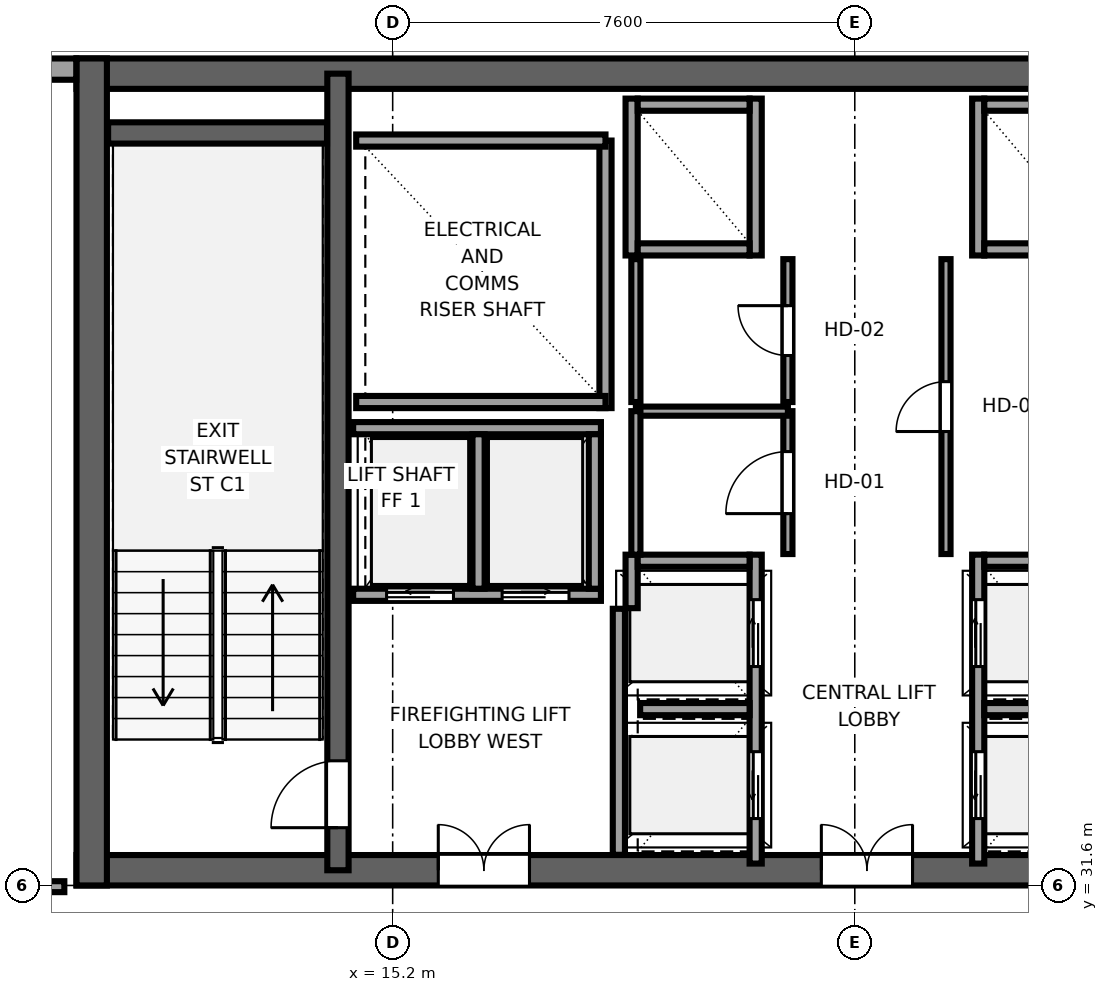
"""IFC4 building model, lengths in metres.
Left out: names, types, materials, properties, quantities, classifications, styles, units other than length and angle.
Written with IfcOpenShell. Run it as: python <this file> out.ifc"""

import sys

from ifc_helpers import new_model, si_unit, direction, frame, frame_2d, origin, place, context, subcontext, project, spatial, rectangle, extrude, source, transform, mapped, element, fill, save


model = new_model("IFC4")
c1 = context("Model", 3, precision=1e-05, world=origin(), true_north=direction((0.0, 1.0)))
c2 = subcontext(c1, "Body", "Model", "MODEL_VIEW")
j1 = project(units=[si_unit("LENGTHUNIT", "METRE"), si_unit("PLANEANGLEUNIT", "RADIAN")], contexts=[c1])
p1 = place(None, origin())
s1 = spatial("IfcSite", under=j1, at=p1, CompositionType="ELEMENT")
p2 = place(p1, origin())
s2 = spatial("IfcBuilding", under=s1, at=p2, CompositionType="ELEMENT")
p3 = place(p2, frame((0.0, 0.0, 245.2)))
s3 = spatial("IfcBuildingStorey", under=s2, at=p3, CompositionType="ELEMENT", Elevation=245.2)
p4 = place(p3, frame((10.0, 31.85, 0.0), z_axis=(0.0, 0.0, 1.0), x_axis=(1.0, 0.0, 0.0)))
e1 = element("IfcWall", 1, at=p4, inside=s3, PredefinedType="SHEAR", context=c2, shape_type="SweptSolid", body=[
    extrude(rectangle(XDim=26.0, YDim=0.5, at=frame_2d((13.0, 0.0))), origin(), (0.0, 0.0, 1.0), 3.55),
])
p5 = place(p4, frame((7.45, 0.0, 0.0), z_axis=(0.0, 0.0, 1.0), x_axis=(-1.0, 0.0, 0.0)))
e2 = element("IfcOpeningElement", 2, at=p5, cuts=e1, PredefinedType="OPENING", context=c2, shape_type="SweptSolid", body=[
    extrude(rectangle(XDim=1.5, YDim=2.04, at=frame_2d((0.75, 1.02))), frame((0.0, 0.26, 0.0), z_axis=(0.0, -1.0, 0.0), x_axis=(1.0, 0.0, 0.0)), (0.0, 0.0, 1.0), 0.52),
])
p6 = place(p4, frame((13.75, 0.0, 0.0), z_axis=(0.0, 0.0, 1.0), x_axis=(-1.0, 0.0, 0.0)))
e3 = element("IfcOpeningElement", 3, at=p6, cuts=e1, PredefinedType="OPENING", context=c2, shape_type="SweptSolid", body=[
    extrude(rectangle(XDim=1.5, YDim=2.04, at=frame_2d((0.75, 1.02))), frame((0.0, 0.26, 0.0), z_axis=(0.0, -1.0, 0.0), x_axis=(1.0, 0.0, 0.0)), (0.0, 0.0, 1.0), 0.52),
])
p7 = place(p4, frame((20.05, 0.0, 0.0), z_axis=(0.0, 0.0, 1.0), x_axis=(-1.0, 0.0, 0.0)))
e4 = element("IfcOpeningElement", 4, at=p7, cuts=e1, PredefinedType="OPENING", context=c2, shape_type="SweptSolid", body=[
    extrude(rectangle(XDim=1.5, YDim=2.04, at=frame_2d((0.75, 1.02))), frame((0.0, 0.26, 0.0), z_axis=(0.0, -1.0, 0.0), x_axis=(1.0, 0.0, 0.0)), (0.0, 0.0, 1.0), 0.52),
])
p8 = place(p3, frame((10.0, 44.95, 0.0), z_axis=(0.0, 0.0, 1.0), x_axis=(1.0, 0.0, 0.0)))
e5 = element("IfcWall", 5, at=p8, inside=s3, PredefinedType="SHEAR", context=c2, shape_type="SweptSolid", body=[
    extrude(rectangle(XDim=26.0, YDim=0.5, at=frame_2d((13.0, 0.0))), origin(), (0.0, 0.0, 1.0), 3.55),
])
p9 = place(p3, frame((10.25, 31.6, 0.0), z_axis=(0.0, 0.0, 1.0), x_axis=(0.0, 1.0, 0.0)))
e6 = element("IfcWall", 6, at=p9, inside=s3, PredefinedType="SHEAR", context=c2, shape_type="SweptSolid", body=[
    extrude(rectangle(XDim=13.6, YDim=0.5, at=frame_2d((6.8, 0.0))), origin(), (0.0, 0.0, 1.0), 3.55),
])
p10 = place(p3, frame((14.3, 31.85, 0.0), z_axis=(0.0, 0.0, 1.0), x_axis=(0.0, 1.0, 0.0)))
e7 = element("IfcWall", 7, at=p10, inside=s3, PredefinedType="SHEAR", context=c2, shape_type="SweptSolid", body=[
    extrude(rectangle(XDim=13.1, YDim=0.35, at=frame_2d((6.55, 0.0))), origin(), (0.0, 0.0, 1.0), 3.55),
])
p11 = place(p10, frame((0.7, 0.0, 0.0)))
e8 = element("IfcOpeningElement", 8, at=p11, cuts=e7, PredefinedType="OPENING", context=c2, shape_type="SweptSolid", body=[
    extrude(rectangle(XDim=1.1, YDim=2.12, at=frame_2d((0.55, 1.06))), frame((0.0, 0.185, 0.0), z_axis=(0.0, -1.0, 0.0), x_axis=(1.0, 0.0, 0.0)), (0.0, 0.0, 1.0), 0.37),
])
p12 = place(p3, frame((10.52, 43.975, 0.0), z_axis=(0.0, 0.0, 1.0), x_axis=(1.0, 0.0, 0.0)))
e9 = element("IfcWall", 9, at=p12, inside=s3, PredefinedType="SHEAR", context=c2, shape_type="SweptSolid", body=[
    extrude(rectangle(XDim=3.6, YDim=0.35, at=frame_2d((1.8, 0.0))), origin(), (0.0, 0.0, 1.0), 3.55),
])
p13 = place(p3, frame((9.996, 45.025, 0.0), z_axis=(0.0, 0.0, 1.0), x_axis=(-1.0, 0.0, 0.0)))
e10 = element("IfcWall", 10, at=p13, inside=s3, PredefinedType="SOLIDWALL", context=c2, shape_type="SweptSolid", body=[
    extrude(rectangle(XDim=2.979, YDim=0.35, at=frame_2d((1.49, 0.0))), origin(), (0.0, 0.0, 1.0), 2.16),
])
p14 = place(p3, frame((18.7, 39.45, 0.0), z_axis=(0.0, 0.0, 1.0), x_axis=(0.0, 1.0, 0.0)))
e11 = element("IfcWall", 11, at=p14, inside=s3, PredefinedType="SOLIDWALL", context=c2, shape_type="SweptSolid", body=[
    extrude(rectangle(XDim=4.4, YDim=0.2, at=frame_2d((2.2, 0.0))), origin(), (0.0, 0.0, 1.0), 3.37),
])
for number, where, z_axis, x_axis in (
    (12, (14.6, 39.55, 0.0), (0.0, 0.0, 1.0), (1.0, 0.0, 0.0)),
    (13, (14.6, 43.85, 0.0), (0.0, 0.0, 1.0), (1.0, 0.0, 0.0)),
):
    element("IfcWall", number, at=place(p3, frame(where, z_axis=z_axis, x_axis=x_axis)), inside=s3, PredefinedType="SOLIDWALL", context=c2, shape_type="SweptSolid", body=[
        extrude(rectangle(XDim=4.1, YDim=0.2, at=frame_2d((2.05, 0.0))), origin(), (0.0, 0.0, 1.0), 3.37),
    ])
p15 = place(p3, frame((18.92, 32.104, 0.0), z_axis=(0.0, 0.0, 1.0), x_axis=(0.0, 1.0, 0.0)))
e14 = element("IfcWall", 14, at=p15, inside=s3, PredefinedType="SOLIDWALL", context=c2, shape_type="SweptSolid", body=[
    extrude(rectangle(XDim=4.046, YDim=0.2, at=frame_2d((2.023, 0.0))), origin(), (0.0, 0.0, 1.0), 3.37),
])
p16 = place(p3, frame((21.17, 31.96, 0.0), z_axis=(0.0, 0.0, 1.0), x_axis=(0.0, 1.0, 0.0)))
e15 = element("IfcWall", 15, at=p16, inside=s3, PredefinedType="SOLIDWALL", context=c2, shape_type="SweptSolid", body=[
    extrude(rectangle(XDim=5.08, YDim=0.2, at=frame_2d((2.54, 0.0))), origin(), (0.0, 0.0, 1.0), 3.37),
])
p17 = place(p16, frame((0.74, 0.0, 0.0)))
e16 = element("IfcOpeningElement", 16, at=p17, cuts=e15, PredefinedType="OPENING", context=c2, shape_type="SweptSolid", body=[
    extrude(rectangle(XDim=1.1, YDim=2.12, at=frame_2d((0.55, 1.06))), frame((0.0, 0.11, 0.0), z_axis=(0.0, -1.0, 0.0), x_axis=(1.0, 0.0, 0.0)), (0.0, 0.0, 1.0), 0.22),
])
p18 = place(p16, frame((3.24, 0.0, 0.0)))
e17 = element("IfcOpeningElement", 17, at=p18, cuts=e15, PredefinedType="OPENING", context=c2, shape_type="SweptSolid", body=[
    extrude(rectangle(XDim=1.1, YDim=2.12, at=frame_2d((0.55, 1.06))), frame((0.0, 0.11, 0.0), z_axis=(0.0, -1.0, 0.0), x_axis=(1.0, 0.0, 0.0)), (0.0, 0.0, 1.0), 0.22),
])
p19 = place(p3, frame((19.13, 36.16, 0.0), z_axis=(0.0, 0.0, 1.0), x_axis=(0.0, 1.0, 0.0)))
e18 = element("IfcWall", 18, at=p19, inside=s3, PredefinedType="SOLIDWALL", context=c2, shape_type="SweptSolid", body=[
    extrude(rectangle(XDim=0.88, YDim=0.2, at=frame_2d((0.44, 0.0))), origin(), (0.0, 0.0, 1.0), 3.37),
])
p20 = place(p3, frame((19.23, 36.94, 0.0), z_axis=(0.0, 0.0, 1.0), x_axis=(1.0, 0.0, 0.0)))
e19 = element("IfcWall", 19, at=p20, inside=s3, PredefinedType="SOLIDWALL", context=c2, shape_type="SweptSolid", body=[
    extrude(rectangle(XDim=1.84, YDim=0.2, at=frame_2d((0.92, 0.0))), origin(), (0.0, 0.0, 1.0), 3.37),
])
p21 = place(p3, frame((19.27, 34.5, 0.0), z_axis=(0.0, 0.0, 1.0), x_axis=(1.0, 0.0, 0.0)))
e20 = element("IfcWall", 20, at=p21, inside=s3, PredefinedType="SOLIDWALL", context=c2, shape_type="SweptSolid", body=[
    extrude(rectangle(XDim=1.8, YDim=0.2, at=frame_2d((0.9, 0.0))), origin(), (0.0, 0.0, 1.0), 3.37),
])
for number, where, z_axis, x_axis in (
    (21, (21.17, 41.96, 0.0), (0.0, 0.0, 1.0), (0.0, 1.0, 0.0)),
    (22, (19.13, 41.96, 0.0), (0.0, 0.0, 1.0), (0.0, 1.0, 0.0)),
):
    element("IfcWall", number, at=place(p3, frame(where, z_axis=z_axis, x_axis=x_axis)), inside=s3, PredefinedType="SOLIDWALL", context=c2, shape_type="SweptSolid", body=[
        extrude(rectangle(XDim=2.58, YDim=0.2, at=frame_2d((1.29, 0.0))), origin(), (0.0, 0.0, 1.0), 3.37),
    ])
for number, where, z_axis, x_axis in (
    (23, (19.23, 42.06, 0.0), (0.0, 0.0, 1.0), (1.0, 0.0, 0.0)),
    (24, (19.23, 44.44, 0.0), (0.0, 0.0, 1.0), (1.0, 0.0, 0.0)),
):
    element("IfcWall", number, at=place(p3, frame(where, z_axis=z_axis, x_axis=x_axis)), inside=s3, PredefinedType="SOLIDWALL", context=c2, shape_type="SweptSolid", body=[
        extrude(rectangle(XDim=1.84, YDim=0.2, at=frame_2d((0.92, 0.0))), origin(), (0.0, 0.0, 1.0), 3.37),
    ])
p22 = place(p3, frame((14.55, 36.38, 0.0), z_axis=(0.0, 0.0, 1.0), x_axis=(1.0, 0.0, 0.0)))
e25 = element("IfcWall", 25, at=p22, inside=s3, PredefinedType="SOLIDWALL", context=c2, shape_type="SweptSolid", body=[
    extrude(rectangle(XDim=4.075, YDim=0.2, at=frame_2d((2.038, 0.0))), origin(), (0.0, 0.0, 1.0), 3.37),
])
p23 = place(p22, frame((0.55, 0.0, 0.0)))
e26 = element("IfcOpeningElement", 26, at=p23, cuts=e25, PredefinedType="OPENING", context=c2, shape_type="SweptSolid", body=[
    extrude(rectangle(XDim=1.1, YDim=2.12, at=frame_2d((0.55, 1.06))), frame((0.0, 0.11, 0.0), z_axis=(0.0, -1.0, 0.0), x_axis=(1.0, 0.0, 0.0)), (0.0, 0.0, 1.0), 0.22),
])
p24 = place(p22, frame((2.45, 0.0, 0.0)))
e27 = element("IfcOpeningElement", 27, at=p24, cuts=e25, PredefinedType="OPENING", context=c2, shape_type="SweptSolid", body=[
    extrude(rectangle(XDim=1.1, YDim=2.12, at=frame_2d((0.55, 1.06))), frame((0.0, 0.11, 0.0), z_axis=(0.0, -1.0, 0.0), x_axis=(1.0, 0.0, 0.0)), (0.0, 0.0, 1.0), 0.22),
])
p25 = place(p3, frame((14.55, 39.12, 0.0), z_axis=(0.0, 0.0, 1.0), x_axis=(1.0, 0.0, 0.0)))
e28 = element("IfcWall", 28, at=p25, inside=s3, PredefinedType="SOLIDWALL", context=c2, shape_type="SweptSolid", body=[
    extrude(rectangle(XDim=4.075, YDim=0.2, at=frame_2d((2.038, 0.0))), origin(), (0.0, 0.0, 1.0), 3.37),
])
for number, where, z_axis, x_axis in (
    (29, (18.525, 36.48, 0.0), (0.0, 0.0, 1.0), (0.0, 1.0, 0.0)),
    (30, (16.613, 36.48, 0.0), (0.0, 0.0, 1.0), (0.0, 1.0, 0.0)),
):
    element("IfcWall", number, at=place(p3, frame(where, z_axis=z_axis, x_axis=x_axis)), inside=s3, PredefinedType="SOLIDWALL", context=c2, shape_type="SweptSolid", body=[
        extrude(rectangle(XDim=2.54, YDim=0.2, at=frame_2d((1.27, 0.0))), origin(), (0.0, 0.0, 1.0), 3.37),
    ])
p26 = place(p3, frame((24.83, 31.96, 0.0), z_axis=(0.0, 0.0, 1.0), x_axis=(0.0, 1.0, 0.0)))
e31 = element("IfcWall", 31, at=p26, inside=s3, PredefinedType="SOLIDWALL", context=c2, shape_type="SweptSolid", body=[
    extrude(rectangle(XDim=5.08, YDim=0.2, at=frame_2d((2.54, 0.0))), origin(), (0.0, 0.0, 1.0), 3.37),
])
p27 = place(p26, frame((0.74, 0.0, 0.0)))
e32 = element("IfcOpeningElement", 32, at=p27, cuts=e31, PredefinedType="OPENING", context=c2, shape_type="SweptSolid", body=[
    extrude(rectangle(XDim=1.1, YDim=2.12, at=frame_2d((0.55, 1.06))), frame((0.0, 0.11, 0.0), z_axis=(0.0, -1.0, 0.0), x_axis=(1.0, 0.0, 0.0)), (0.0, 0.0, 1.0), 0.22),
])
p28 = place(p26, frame((3.24, 0.0, 0.0)))
e33 = element("IfcOpeningElement", 33, at=p28, cuts=e31, PredefinedType="OPENING", context=c2, shape_type="SweptSolid", body=[
    extrude(rectangle(XDim=1.1, YDim=2.12, at=frame_2d((0.55, 1.06))), frame((0.0, 0.11, 0.0), z_axis=(0.0, -1.0, 0.0), x_axis=(1.0, 0.0, 0.0)), (0.0, 0.0, 1.0), 0.22),
])
p29 = place(p3, frame((24.93, 36.94, 0.0), z_axis=(0.0, 0.0, 1.0), x_axis=(1.0, 0.0, 0.0)))
e34 = element("IfcWall", 34, at=p29, inside=s3, PredefinedType="SOLIDWALL", context=c2, shape_type="SweptSolid", body=[
    extrude(rectangle(XDim=1.84, YDim=0.2, at=frame_2d((0.92, 0.0))), origin(), (0.0, 0.0, 1.0), 3.37),
])
p30 = place(p3, frame((24.93, 34.5, 0.0), z_axis=(0.0, 0.0, 1.0), x_axis=(1.0, 0.0, 0.0)))
e35 = element("IfcWall", 35, at=p30, inside=s3, PredefinedType="SOLIDWALL", context=c2, shape_type="SweptSolid", body=[
    extrude(rectangle(XDim=1.8, YDim=0.2, at=frame_2d((0.9, 0.0))), origin(), (0.0, 0.0, 1.0), 3.37),
])
p31 = place(p3, frame((24.83, 41.96, 0.0), z_axis=(0.0, 0.0, 1.0), x_axis=(0.0, 1.0, 0.0)))
e36 = element("IfcWall", 36, at=p31, inside=s3, PredefinedType="SOLIDWALL", context=c2, shape_type="SweptSolid", body=[
    extrude(rectangle(XDim=2.58, YDim=0.2, at=frame_2d((1.29, 0.0))), origin(), (0.0, 0.0, 1.0), 3.37),
])
for number, where, z_axis, x_axis in (
    (37, (24.93, 42.06, 0.0), (0.0, 0.0, 1.0), (1.0, 0.0, 0.0)),
    (38, (24.93, 44.44, 0.0), (0.0, 0.0, 1.0), (1.0, 0.0, 0.0)),
):
    element("IfcWall", number, at=place(p3, frame(where, z_axis=z_axis, x_axis=x_axis)), inside=s3, PredefinedType="SOLIDWALL", context=c2, shape_type="SweptSolid", body=[
        extrude(rectangle(XDim=1.84, YDim=0.2, at=frame_2d((0.92, 0.0))), origin(), (0.0, 0.0, 1.0), 3.37),
    ])
p32 = place(p3, frame((21.7, 37.05, 0.0), z_axis=(0.0, 0.0, 1.0), x_axis=(0.0, 1.0, 0.0)))
e39 = element("IfcWall", 39, at=p32, inside=s3, PredefinedType="PARTITIONING", context=c2, shape_type="SweptSolid", body=[
    extrude(rectangle(XDim=2.35, YDim=0.15, at=frame_2d((1.175, 0.0))), origin(), (0.0, 0.0, 1.0), 3.37),
])
p33 = place(p32, frame((0.665, 0.0, 0.0)))
e40 = element("IfcOpeningElement", 40, at=p33, cuts=e39, PredefinedType="OPENING", context=c2, shape_type="SweptSolid", body=[
    extrude(rectangle(XDim=1.02, YDim=2.03, at=frame_2d((0.51, 1.015))), frame((0.0, 0.085, 0.0), z_axis=(0.0, -1.0, 0.0), x_axis=(1.0, 0.0, 0.0)), (0.0, 0.0, 1.0), 0.17),
])
p34 = place(p3, frame((19.2, 39.4, 0.0), z_axis=(0.0, 0.0, 1.0), x_axis=(1.0, 0.0, 0.0)))
e41 = element("IfcWall", 41, at=p34, inside=s3, PredefinedType="PARTITIONING", context=c2, shape_type="SweptSolid", body=[
    extrude(rectangle(XDim=2.5, YDim=0.15, at=frame_2d((1.25, 0.0))), origin(), (0.0, 0.0, 1.0), 3.37),
])
p35 = place(p3, frame((19.2, 37.04, 0.0), z_axis=(0.0, 0.0, 1.0), x_axis=(0.0, 1.0, 0.0)))
e42 = element("IfcWall", 42, at=p35, inside=s3, PredefinedType="PARTITIONING", context=c2, shape_type="SweptSolid", body=[
    extrude(rectangle(XDim=2.36, YDim=0.15, at=frame_2d((1.18, 0.0))), origin(), (0.0, 0.0, 1.0), 3.37),
])
p36 = place(p3, frame((21.7, 39.55, 0.0), z_axis=(0.0, 0.0, 1.0), x_axis=(0.0, 1.0, 0.0)))
e43 = element("IfcWall", 43, at=p36, inside=s3, PredefinedType="PARTITIONING", context=c2, shape_type="SweptSolid", body=[
    extrude(rectangle(XDim=2.35, YDim=0.15, at=frame_2d((1.175, 0.0))), origin(), (0.0, 0.0, 1.0), 3.37),
])
p37 = place(p36, frame((0.765, 0.0, 0.0)))
e44 = element("IfcOpeningElement", 44, at=p37, cuts=e43, PredefinedType="OPENING", context=c2, shape_type="SweptSolid", body=[
    extrude(rectangle(XDim=0.82, YDim=2.01, at=frame_2d((0.41, 1.005))), frame((0.0, 0.085, 0.0), z_axis=(0.0, -1.0, 0.0), x_axis=(1.0, 0.0, 0.0)), (0.0, 0.0, 1.0), 0.17),
])
p38 = place(p3, frame((19.2, 39.55, 0.0), z_axis=(0.0, 0.0, 1.0), x_axis=(0.0, 1.0, 0.0)))
e45 = element("IfcWall", 45, at=p38, inside=s3, PredefinedType="PARTITIONING", context=c2, shape_type="SweptSolid", body=[
    extrude(rectangle(XDim=2.35, YDim=0.15, at=frame_2d((1.175, 0.0))), origin(), (0.0, 0.0, 1.0), 3.37),
])
p39 = place(p3, frame((24.3, 37.05, 0.0), z_axis=(0.0, 0.0, 1.0), x_axis=(0.0, 1.0, 0.0)))
e46 = element("IfcWall", 46, at=p39, inside=s3, PredefinedType="PARTITIONING", context=c2, shape_type="SweptSolid", body=[
    extrude(rectangle(XDim=4.85, YDim=0.15, at=frame_2d((2.425, 0.0))), origin(), (0.0, 0.0, 1.0), 3.37),
])
p40 = place(p39, frame((2.015, 0.0, 0.0)))
e47 = element("IfcOpeningElement", 47, at=p40, cuts=e46, PredefinedType="OPENING", context=c2, shape_type="SweptSolid", body=[
    extrude(rectangle(XDim=0.82, YDim=2.01, at=frame_2d((0.41, 1.005))), frame((0.0, 0.085, 0.0), z_axis=(0.0, -1.0, 0.0), x_axis=(1.0, 0.0, 0.0)), (0.0, 0.0, 1.0), 0.17),
])
p41 = place(p3, frame((3.005, 31.58, 0.0), z_axis=(0.0, 0.0, 1.0), x_axis=(1.0, 0.0, 0.0)))
e48 = element("IfcWall", 48, at=p41, inside=s3, PredefinedType="PARTITIONING", context=c2, shape_type="SweptSolid", body=[
    extrude(rectangle(XDim=6.795, YDim=0.18, at=frame_2d((3.397, 0.0))), origin(), (0.0, 0.0, 1.0), 3.37),
])
p42 = place(p41, frame((0.285, 0.0, 0.0)))
e49 = element("IfcOpeningElement", 49, at=p42, cuts=e48, PredefinedType="OPENING", context=c2, shape_type="SweptSolid", body=[
    extrude(rectangle(XDim=0.98, YDim=2.12, at=frame_2d((0.49, 1.06))), frame((0.0, 0.1, 0.0), z_axis=(0.0, -1.0, 0.0), x_axis=(1.0, 0.0, 0.0)), (0.0, 0.0, 1.0), 0.2),
])
m1 = source(origin(), c2, "Body", "SweptSolid", [
    extrude(rectangle(XDim=1.1, YDim=2.12, at=frame_2d((0.55, 1.06))), frame((0.0, 0.025, 0.0), z_axis=(0.0, -1.0, 0.0), x_axis=(1.0, 0.0, 0.0)), (0.0, 0.0, 1.0), 0.05),
])
p43 = place(p11, origin())
e50 = element("IfcDoor", 50, at=p43, inside=s3, OperationType="SINGLE_SWING_LEFT", PredefinedType="DOOR", context=c2, shape_type="MappedRepresentation", body=[
    mapped(m1, transform((0.0, 0.0, 0.0), x_axis=(1.0, 0.0, 0.0), y_axis=(0.0, 1.0, 0.0), z_axis=(0.0, 0.0, 1.0), scale=1.0)),
])
fill(e8, e50)
m2 = source(origin(), c2, "Body", "SweptSolid", [
    extrude(rectangle(XDim=1.5, YDim=2.04, at=frame_2d((0.75, 1.02))), frame((0.0, 0.025, 0.0), z_axis=(0.0, -1.0, 0.0), x_axis=(1.0, 0.0, 0.0)), (0.0, 0.0, 1.0), 0.05),
])
p44 = place(p5, origin())
e51 = element("IfcDoor", 51, at=p44, inside=s3, OperationType="DOUBLE_DOOR_SINGLE_SWING", PredefinedType="DOOR", context=c2, shape_type="MappedRepresentation", body=[
    mapped(m2, transform((0.0, 0.0, 0.0), x_axis=(1.0, 0.0, 0.0), y_axis=(0.0, 1.0, 0.0), z_axis=(0.0, 0.0, 1.0), scale=1.0)),
])
fill(e2, e51)
p45 = place(p6, origin())
e52 = element("IfcDoor", 52, at=p45, inside=s3, OperationType="DOUBLE_DOOR_SINGLE_SWING", PredefinedType="DOOR", context=c2, shape_type="MappedRepresentation", body=[
    mapped(m2, transform((0.0, 0.0, 0.0), x_axis=(1.0, 0.0, 0.0), y_axis=(0.0, 1.0, 0.0), z_axis=(0.0, 0.0, 1.0), scale=1.0)),
])
fill(e3, e52)
m3 = source(origin(), c2, "Body", "SweptSolid", [
    extrude(rectangle(XDim=1.1, YDim=2.12, at=frame_2d((0.55, 1.06))), frame((0.0, 0.025, 0.0), z_axis=(0.0, -1.0, 0.0), x_axis=(1.0, 0.0, 0.0)), (0.0, 0.0, 1.0), 0.05),
])
p46 = place(p17, origin())
e53 = element("IfcDoor", 53, at=p46, inside=s3, OperationType="SLIDING_TO_LEFT", PredefinedType="DOOR", context=c2, shape_type="MappedRepresentation", body=[
    mapped(m3, transform((0.0, 0.0, 0.0), x_axis=(1.0, 0.0, 0.0), y_axis=(0.0, 1.0, 0.0), z_axis=(0.0, 0.0, 1.0), scale=1.0)),
])
fill(e16, e53)
p47 = place(p18, origin())
e54 = element("IfcDoor", 54, at=p47, inside=s3, OperationType="SLIDING_TO_RIGHT", PredefinedType="DOOR", context=c2, shape_type="MappedRepresentation", body=[
    mapped(m3, transform((0.0, 0.0, 0.0), x_axis=(1.0, 0.0, 0.0), y_axis=(0.0, 1.0, 0.0), z_axis=(0.0, 0.0, 1.0), scale=1.0)),
])
fill(e17, e54)
p48 = place(p23, origin())
e55 = element("IfcDoor", 55, at=p48, inside=s3, OperationType="SLIDING_TO_LEFT", PredefinedType="DOOR", context=c2, shape_type="MappedRepresentation", body=[
    mapped(m3, transform((0.0, 0.0, 0.0), x_axis=(1.0, 0.0, 0.0), y_axis=(0.0, 1.0, 0.0), z_axis=(0.0, 0.0, 1.0), scale=1.0)),
])
fill(e26, e55)
p49 = place(p24, origin())
e56 = element("IfcDoor", 56, at=p49, inside=s3, OperationType="SLIDING_TO_RIGHT", PredefinedType="DOOR", context=c2, shape_type="MappedRepresentation", body=[
    mapped(m3, transform((0.0, 0.0, 0.0), x_axis=(1.0, 0.0, 0.0), y_axis=(0.0, 1.0, 0.0), z_axis=(0.0, 0.0, 1.0), scale=1.0)),
])
fill(e27, e56)
p50 = place(p27, origin())
e57 = element("IfcDoor", 57, at=p50, inside=s3, OperationType="SLIDING_TO_LEFT", PredefinedType="DOOR", context=c2, shape_type="MappedRepresentation", body=[
    mapped(m3, transform((0.0, 0.0, 0.0), x_axis=(1.0, 0.0, 0.0), y_axis=(0.0, 1.0, 0.0), z_axis=(0.0, 0.0, 1.0), scale=1.0)),
])
fill(e32, e57)
p51 = place(p28, origin())
e58 = element("IfcDoor", 58, at=p51, inside=s3, OperationType="SLIDING_TO_RIGHT", PredefinedType="DOOR", context=c2, shape_type="MappedRepresentation", body=[
    mapped(m3, transform((0.0, 0.0, 0.0), x_axis=(1.0, 0.0, 0.0), y_axis=(0.0, 1.0, 0.0), z_axis=(0.0, 0.0, 1.0), scale=1.0)),
])
fill(e33, e58)
m4 = source(origin(), c2, "Body", "SweptSolid", [
    extrude(rectangle(XDim=1.02, YDim=2.03, at=frame_2d((0.51, 1.015))), frame((0.0, 0.025, 0.0), z_axis=(0.0, -1.0, 0.0), x_axis=(1.0, 0.0, 0.0)), (0.0, 0.0, 1.0), 0.05),
])
p52 = place(p33, origin())
e59 = element("IfcDoor", 59, at=p52, inside=s3, OperationType="SINGLE_SWING_LEFT", PredefinedType="DOOR", context=c2, shape_type="MappedRepresentation", body=[
    mapped(m4, transform((0.0, 0.0, 0.0), x_axis=(1.0, 0.0, 0.0), y_axis=(0.0, 1.0, 0.0), z_axis=(0.0, 0.0, 1.0), scale=1.0)),
])
fill(e40, e59)
m5 = source(origin(), c2, "Body", "SweptSolid", [
    extrude(rectangle(XDim=0.82, YDim=2.01, at=frame_2d((0.41, 1.005))), frame((0.0, 0.025, 0.0), z_axis=(0.0, -1.0, 0.0), x_axis=(1.0, 0.0, 0.0)), (0.0, 0.0, 1.0), 0.05),
])
p53 = place(p37, origin())
e60 = element("IfcDoor", 60, at=p53, inside=s3, OperationType="SINGLE_SWING_RIGHT", PredefinedType="DOOR", context=c2, shape_type="MappedRepresentation", body=[
    mapped(m5, transform((0.0, 0.0, 0.0), x_axis=(1.0, 0.0, 0.0), y_axis=(0.0, 1.0, 0.0), z_axis=(0.0, 0.0, 1.0), scale=1.0)),
])
fill(e44, e60)
p54 = place(p40, origin())
e61 = element("IfcDoor", 61, at=p54, inside=s3, OperationType="SINGLE_SWING_LEFT", PredefinedType="DOOR", context=c2, shape_type="MappedRepresentation", body=[
    mapped(m5, transform((0.0, 0.0, 0.0), x_axis=(1.0, 0.0, 0.0), y_axis=(0.0, 1.0, 0.0), z_axis=(0.0, 0.0, 1.0), scale=1.0)),
])
fill(e47, e61)
save(model, sys.argv[1])
